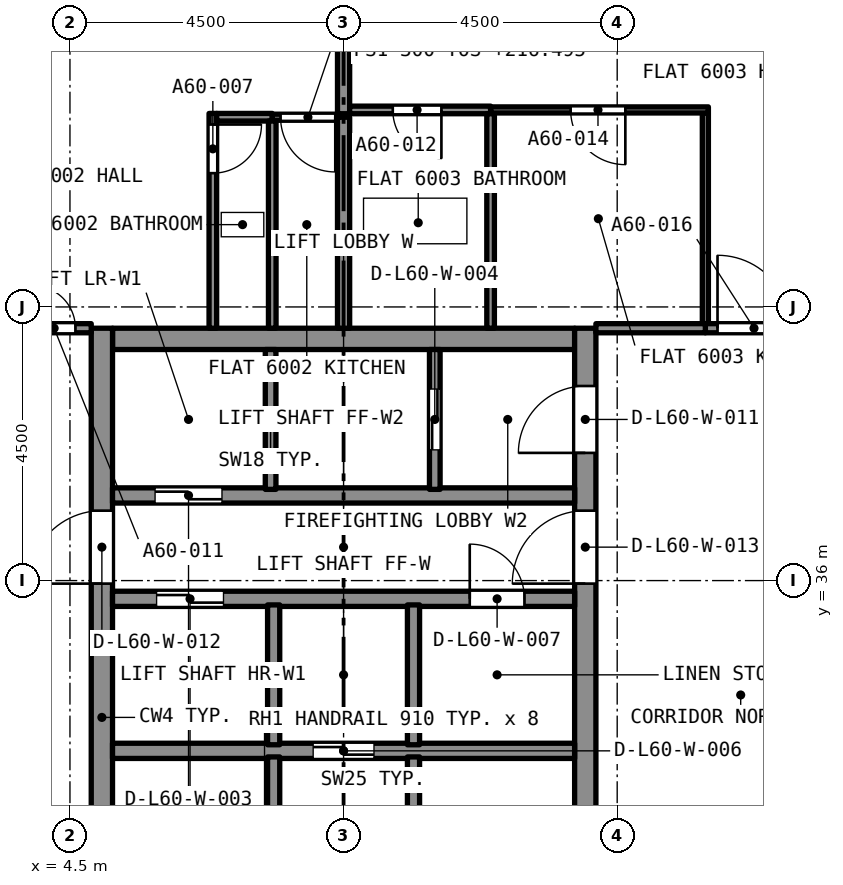
"""IFC4 building model, lengths in metres.
Left out: names, types, materials, properties, quantities, classifications, styles, units other than length and angle.
Written with IfcOpenShell. Run it as: python <this file> out.ifc"""

import sys

from ifc_helpers import new_model, si_unit, direction, frame, frame_2d, origin, place, context, subcontext, project, spatial, rectangle, extrude, element, fill, save


model = new_model("IFC4")
c1 = context("Model", 3, precision=1e-05, world=origin(), true_north=direction((0.0, 1.0)))
c2 = subcontext(c1, "Body", "Model", "MODEL_VIEW")
j1 = project(units=[si_unit("LENGTHUNIT", "METRE"), si_unit("PLANEANGLEUNIT", "RADIAN")], contexts=[c1])
p1 = place(None, origin())
s1 = spatial("IfcSite", under=j1, at=p1, CompositionType="ELEMENT")
p2 = place(p1, origin())
s2 = spatial("IfcBuilding", under=s1, at=p2, CompositionType="ELEMENT")
p3 = place(p2, frame((0.0, 0.0, 216.495)))
s3 = spatial("IfcBuildingStorey", under=s2, at=p3, CompositionType="ELEMENT", Elevation=216.495)
p4 = place(p3, frame((5.2, 39.975, 0.0), z_axis=(0.0, 0.0, 1.0), x_axis=(1.0, 0.0, 0.0)))
e1 = element("IfcWall", 1, at=p4, inside=s3, PredefinedType="SOLIDWALL", context=c2, shape_type="SweptSolid", body=[
    extrude(rectangle(XDim=7.6, YDim=0.35, at=frame_2d((3.8, 0.0))), origin(), (0.0, 0.0, 1.0), 3.2),
])
p5 = place(p3, frame((5.025, 27.35, 0.0), z_axis=(0.0, 0.0, 1.0), x_axis=(0.0, 1.0, 0.0)))
e2 = element("IfcWall", 2, at=p5, inside=s3, PredefinedType="SOLIDWALL", context=c2, shape_type="SweptSolid", body=[
    extrude(rectangle(XDim=12.8, YDim=0.35, at=frame_2d((6.4, 0.0))), origin(), (0.0, 0.0, 1.0), 3.2),
])
p6 = place(p5, frame((8.6, 0.0, 0.0)))
e3 = element("IfcOpeningElement", 3, at=p6, cuts=e2, PredefinedType="OPENING", context=c2, shape_type="SweptSolid", body=[
    extrude(rectangle(XDim=1.2, YDim=2.1, at=frame_2d((0.6, 1.05))), frame((0.0, 0.185, 0.0), z_axis=(0.0, -1.0, 0.0), x_axis=(1.0, 0.0, 0.0)), (0.0, 0.0, 1.0), 0.37),
])
p7 = place(p3, frame((12.975, 27.35, 0.0), z_axis=(0.0, 0.0, 1.0), x_axis=(0.0, 1.0, 0.0)))
e4 = element("IfcWall", 4, at=p7, inside=s3, PredefinedType="SOLIDWALL", context=c2, shape_type="SweptSolid", body=[
    extrude(rectangle(XDim=12.8, YDim=0.35, at=frame_2d((6.4, 0.0))), origin(), (0.0, 0.0, 1.0), 3.2),
])
p8 = place(p7, frame((10.75, 0.0, 0.0)))
e5 = element("IfcOpeningElement", 5, at=p8, cuts=e4, PredefinedType="OPENING", context=c2, shape_type="SweptSolid", body=[
    extrude(rectangle(XDim=1.1, YDim=2.1, at=frame_2d((0.55, 1.05))), frame((0.0, 0.185, 0.0), z_axis=(0.0, -1.0, 0.0), x_axis=(1.0, 0.0, 0.0)), (0.0, 0.0, 1.0), 0.37),
])
p9 = place(p7, frame((8.6, 0.0, 0.0)))
e6 = element("IfcOpeningElement", 6, at=p9, cuts=e4, PredefinedType="OPENING", context=c2, shape_type="SweptSolid", body=[
    extrude(rectangle(XDim=1.2, YDim=2.1, at=frame_2d((0.6, 1.05))), frame((0.0, 0.185, 0.0), z_axis=(0.0, -1.0, 0.0), x_axis=(1.0, 0.0, 0.0)), (0.0, 0.0, 1.0), 0.37),
])
p10 = place(p3, frame((6.85, 43.683, 0.0), z_axis=(0.0, 0.0, 1.0), x_axis=(0.0, -1.0, 0.0)))
e7 = element("IfcWall", 7, at=p10, inside=s3, PredefinedType="PARTITIONING", context=c2, shape_type="SweptSolid", body=[
    extrude(rectangle(XDim=3.533, YDim=0.125, at=frame_2d((1.766, 0.0))), origin(), (0.0, 0.0, 1.0), 2.9),
])
p11 = place(p10, frame((0.183, 0.0, 0.0)))
e8 = element("IfcOpeningElement", 8, at=p11, cuts=e7, PredefinedType="OPENING", context=c2, shape_type="SweptSolid", body=[
    extrude(rectangle(XDim=0.8, YDim=2.1, at=frame_2d((0.4, 1.05))), frame((0.0, 0.073, 0.0), z_axis=(0.0, -1.0, 0.0), x_axis=(1.0, 0.0, 0.0)), (0.0, 0.0, 1.0), 0.145),
])
p12 = place(p3, frame((6.913, 43.62, 0.0), z_axis=(0.0, 0.0, 1.0), x_axis=(1.0, 0.0, 0.0)))
e9 = element("IfcWall", 9, at=p12, inside=s3, PredefinedType="PARTITIONING", context=c2, shape_type="SweptSolid", body=[
    extrude(rectangle(XDim=0.915, YDim=0.125, at=frame_2d((0.458, 0.0))), origin(), (0.0, 0.0, 1.0), 2.9),
])
p13 = place(p3, frame((7.827, 40.15, 0.0), z_axis=(0.0, 0.0, 1.0), x_axis=(0.0, 1.0, 0.0)))
e10 = element("IfcWall", 10, at=p13, inside=s3, PredefinedType="PARTITIONING", context=c2, shape_type="SweptSolid", body=[
    extrude(rectangle(XDim=3.408, YDim=0.125, at=frame_2d((1.704, 0.0))), origin(), (0.0, 0.0, 1.0), 2.9),
])
p14 = place(p3, frame((9.0, 43.62, 0.0), z_axis=(0.0, 0.0, 1.0), x_axis=(-1.0, 0.0, 0.0)))
e11 = element("IfcWall", 11, at=p14, inside=s3, PredefinedType="PARTITIONING", context=c2, shape_type="SweptSolid", body=[
    extrude(rectangle(XDim=1.173, YDim=0.1, at=frame_2d((0.586, 0.0))), origin(), (0.0, 0.0, 1.0), 2.9),
])
p15 = place(p14, frame((0.136, 0.0, 0.0)))
e12 = element("IfcOpeningElement", 12, at=p15, cuts=e11, PredefinedType="OPENING", context=c2, shape_type="SweptSolid", body=[
    extrude(rectangle(XDim=0.9, YDim=2.1, at=frame_2d((0.45, 1.05))), frame((0.0, 0.06, 0.0), z_axis=(0.0, -1.0, 0.0), x_axis=(1.0, 0.0, 0.0)), (0.0, 0.0, 1.0), 0.12),
])
p16 = place(p3, frame((9.0, 43.677, 0.0), z_axis=(0.0, 0.0, 1.0), x_axis=(0.0, 1.0, 0.0)))
e13 = element("IfcWall", 13, at=p16, inside=s3, PredefinedType="PARTITIONING", context=c2, shape_type="SweptSolid", body=[
    extrude(rectangle(XDim=1.373, YDim=0.2, at=frame_2d((0.686, 0.0))), origin(), (0.0, 0.0, 1.0), 2.9),
])
p17 = place(p3, frame((3.65, 40.15, 0.0), z_axis=(0.0, 0.0, 1.0), x_axis=(1.0, 0.0, 0.0)))
e14 = element("IfcWall", 14, at=p17, inside=s3, PredefinedType="PARTITIONING", context=c2, shape_type="SweptSolid", body=[
    extrude(rectangle(XDim=1.2, YDim=0.15, at=frame_2d((0.6, 0.0))), origin(), (0.0, 0.0, 1.0), 2.9),
])
p18 = place(p17, frame((0.24, 0.0, 0.0)))
e15 = element("IfcOpeningElement", 15, at=p18, cuts=e14, PredefinedType="OPENING", context=c2, shape_type="SweptSolid", body=[
    extrude(rectangle(XDim=0.7, YDim=2.1, at=frame_2d((0.35, 1.05))), frame((0.0, 0.085, 0.0), z_axis=(0.0, -1.0, 0.0), x_axis=(1.0, 0.0, 0.0)), (0.0, 0.0, 1.0), 0.17),
])
p19 = place(p3, frame((9.0, 40.15, 0.0), z_axis=(0.0, 0.0, 1.0), x_axis=(0.0, 1.0, 0.0)))
e16 = element("IfcWall", 16, at=p19, inside=s3, PredefinedType="PARTITIONING", context=c2, shape_type="SweptSolid", body=[
    extrude(rectangle(XDim=3.47, YDim=0.2, at=frame_2d((1.735, 0.0))), origin(), (0.0, 0.0, 1.0), 2.9),
])
p20 = place(p3, frame((11.418, 43.74, 0.0), z_axis=(0.0, 0.0, 1.0), x_axis=(-1.0, 0.0, 0.0)))
e17 = element("IfcWall", 17, at=p20, inside=s3, PredefinedType="PARTITIONING", context=c2, shape_type="SweptSolid", body=[
    extrude(rectangle(XDim=2.318, YDim=0.125, at=frame_2d((1.159, 0.0))), origin(), (0.0, 0.0, 1.0), 2.9),
])
p21 = place(p20, frame((0.809, 0.0, 0.0)))
e18 = element("IfcOpeningElement", 18, at=p21, cuts=e17, PredefinedType="OPENING", context=c2, shape_type="SweptSolid", body=[
    extrude(rectangle(XDim=0.8, YDim=2.1, at=frame_2d((0.4, 1.05))), frame((0.0, 0.073, 0.0), z_axis=(0.0, -1.0, 0.0), x_axis=(1.0, 0.0, 0.0)), (0.0, 0.0, 1.0), 0.145),
])
p22 = place(p3, frame((11.418, 40.15, 0.0), z_axis=(0.0, 0.0, 1.0), x_axis=(0.0, 1.0, 0.0)))
e19 = element("IfcWall", 19, at=p22, inside=s3, PredefinedType="PARTITIONING", context=c2, shape_type="SweptSolid", body=[
    extrude(rectangle(XDim=3.528, YDim=0.125, at=frame_2d((1.764, 0.0))), origin(), (0.0, 0.0, 1.0), 2.9),
])
p23 = place(p3, frame((14.95, 40.225, 0.0), z_axis=(0.0, 0.0, 1.0), x_axis=(0.0, 1.0, 0.0)))
e20 = element("IfcWall", 20, at=p23, inside=s3, PredefinedType="PARTITIONING", context=c2, shape_type="SweptSolid", body=[
    extrude(rectangle(XDim=3.465, YDim=0.1, at=frame_2d((1.732, 0.0))), origin(), (0.0, 0.0, 1.0), 2.9),
])
p24 = place(p3, frame((15.0, 43.74, 0.0), z_axis=(0.0, 0.0, 1.0), x_axis=(-1.0, 0.0, 0.0)))
e21 = element("IfcWall", 21, at=p24, inside=s3, PredefinedType="PARTITIONING", context=c2, shape_type="SweptSolid", body=[
    extrude(rectangle(XDim=3.582, YDim=0.1, at=frame_2d((1.791, 0.0))), origin(), (0.0, 0.0, 1.0), 2.9),
])
p25 = place(p24, frame((1.366, 0.0, 0.0)))
e22 = element("IfcOpeningElement", 22, at=p25, cuts=e21, PredefinedType="OPENING", context=c2, shape_type="SweptSolid", body=[
    extrude(rectangle(XDim=0.9, YDim=2.1, at=frame_2d((0.45, 1.05))), frame((0.0, 0.06, 0.0), z_axis=(0.0, -1.0, 0.0), x_axis=(1.0, 0.0, 0.0)), (0.0, 0.0, 1.0), 0.12),
])
p26 = place(p3, frame((14.95, 40.15, 0.0), z_axis=(0.0, 0.0, 1.0), x_axis=(1.0, 0.0, 0.0)))
e23 = element("IfcWall", 23, at=p26, inside=s3, PredefinedType="PARTITIONING", context=c2, shape_type="SweptSolid", body=[
    extrude(rectangle(XDim=2.65, YDim=0.15, at=frame_2d((1.325, 0.0))), origin(), (0.0, 0.0, 1.0), 2.9),
])
p27 = place(p26, frame((0.2, 0.0, 0.0)))
e24 = element("IfcOpeningElement", 24, at=p27, cuts=e23, PredefinedType="OPENING", context=c2, shape_type="SweptSolid", body=[
    extrude(rectangle(XDim=1.2, YDim=2.4, at=frame_2d((0.6, 1.2))), frame((0.0, 0.085, 0.0), z_axis=(0.0, -1.0, 0.0), x_axis=(1.0, 0.0, 0.0)), (0.0, 0.0, 1.0), 0.17),
])
p28 = place(p3, frame((13.15, 40.15, 0.0), z_axis=(0.0, 0.0, 1.0), x_axis=(1.0, 0.0, 0.0)))
e25 = element("IfcWall", 25, at=p28, inside=s3, PredefinedType="PARTITIONING", context=c2, shape_type="SweptSolid", body=[
    extrude(rectangle(XDim=1.8, YDim=0.15, at=frame_2d((0.9, 0.0))), origin(), (0.0, 0.0, 1.0), 2.9),
])
p29 = place(p3, frame((5.2, 33.2, 0.0), z_axis=(0.0, 0.0, 1.0), x_axis=(1.0, 0.0, 0.0)))
e26 = element("IfcWall", 26, at=p29, inside=s3, PredefinedType="SOLIDWALL", context=c2, shape_type="SweptSolid", body=[
    extrude(rectangle(XDim=7.6, YDim=0.25, at=frame_2d((3.8, 0.0))), origin(), (0.0, 0.0, 1.0), 2.9),
])
p30 = place(p29, frame((3.3, 0.0, 0.0)))
e27 = element("IfcOpeningElement", 27, at=p30, cuts=e26, PredefinedType="OPENING", context=c2, shape_type="SweptSolid", body=[
    extrude(rectangle(XDim=1.0, YDim=2.1, at=frame_2d((0.5, 1.05))), frame((0.0, 0.135, 0.0), z_axis=(0.0, -1.0, 0.0), x_axis=(1.0, 0.0, 0.0)), (0.0, 0.0, 1.0), 0.27),
])
p31 = place(p3, frame((5.2, 35.7, 0.0), z_axis=(0.0, 0.0, 1.0), x_axis=(1.0, 0.0, 0.0)))
e28 = element("IfcWall", 28, at=p31, inside=s3, PredefinedType="SOLIDWALL", context=c2, shape_type="SweptSolid", body=[
    extrude(rectangle(XDim=7.6, YDim=0.25, at=frame_2d((3.8, 0.0))), origin(), (0.0, 0.0, 1.0), 2.9),
])
p32 = place(p31, frame((0.725, 0.0, 0.0)))
e29 = element("IfcOpeningElement", 29, at=p32, cuts=e28, PredefinedType="OPENING", context=c2, shape_type="SweptSolid", body=[
    extrude(rectangle(XDim=1.1, YDim=2.4, at=frame_2d((0.55, 1.2))), frame((0.0, 0.135, 0.0), z_axis=(0.0, -1.0, 0.0), x_axis=(1.0, 0.0, 0.0)), (0.0, 0.0, 1.0), 0.27),
])
p33 = place(p31, frame((5.875, 0.0, 0.0)))
e30 = element("IfcOpeningElement", 30, at=p33, cuts=e28, PredefinedType="OPENING", context=c2, shape_type="SweptSolid", body=[
    extrude(rectangle(XDim=0.9, YDim=2.1, at=frame_2d((0.45, 1.05))), frame((0.0, 0.135, 0.0), z_axis=(0.0, -1.0, 0.0), x_axis=(1.0, 0.0, 0.0)), (0.0, 0.0, 1.0), 0.27),
])
p34 = place(p3, frame((5.2, 37.4, 0.0), z_axis=(0.0, 0.0, 1.0), x_axis=(1.0, 0.0, 0.0)))
e31 = element("IfcWall", 31, at=p34, inside=s3, PredefinedType="SOLIDWALL", context=c2, shape_type="SweptSolid", body=[
    extrude(rectangle(XDim=7.6, YDim=0.25, at=frame_2d((3.8, 0.0))), origin(), (0.0, 0.0, 1.0), 2.9),
])
p35 = place(p34, frame((0.7, 0.0, 0.0)))
e32 = element("IfcOpeningElement", 32, at=p35, cuts=e31, PredefinedType="OPENING", context=c2, shape_type="SweptSolid", body=[
    extrude(rectangle(XDim=1.1, YDim=2.4, at=frame_2d((0.55, 1.2))), frame((0.0, 0.135, 0.0), z_axis=(0.0, -1.0, 0.0), x_axis=(1.0, 0.0, 0.0)), (0.0, 0.0, 1.0), 0.27),
])
p36 = place(p3, frame((7.85, 27.7, 0.0), z_axis=(0.0, 0.0, 1.0), x_axis=(0.0, 1.0, 0.0)))
e33 = element("IfcWall", 33, at=p36, inside=s3, PredefinedType="SOLIDWALL", context=c2, shape_type="SweptSolid", body=[
    extrude(rectangle(XDim=5.4, YDim=0.2, at=frame_2d((2.7, 0.0))), origin(), (0.0, 0.0, 1.0), 2.9),
])
p37 = place(p36, frame((0.2, 0.0, 0.0)))
e34 = element("IfcOpeningElement", 34, at=p37, cuts=e33, PredefinedType="OPENING", context=c2, shape_type="SweptSolid", body=[
    extrude(rectangle(XDim=0.9, YDim=2.1, at=frame_2d((0.45, 1.05))), frame((0.0, 0.11, 0.0), z_axis=(0.0, -1.0, 0.0), x_axis=(1.0, 0.0, 0.0)), (0.0, 0.0, 1.0), 0.22),
])
p38 = place(p3, frame((10.15, 27.7, 0.0), z_axis=(0.0, 0.0, 1.0), x_axis=(0.0, 1.0, 0.0)))
e35 = element("IfcWall", 35, at=p38, inside=s3, PredefinedType="SOLIDWALL", context=c2, shape_type="SweptSolid", body=[
    extrude(rectangle(XDim=5.4, YDim=0.2, at=frame_2d((2.7, 0.0))), origin(), (0.0, 0.0, 1.0), 2.9),
])
p39 = place(p38, frame((0.2, 0.0, 0.0)))
e36 = element("IfcOpeningElement", 36, at=p39, cuts=e35, PredefinedType="OPENING", context=c2, shape_type="SweptSolid", body=[
    extrude(rectangle(XDim=0.9, YDim=2.1, at=frame_2d((0.45, 1.05))), frame((0.0, 0.11, 0.0), z_axis=(0.0, -1.0, 0.0), x_axis=(1.0, 0.0, 0.0)), (0.0, 0.0, 1.0), 0.22),
])
for number, where, z_axis, x_axis in (
    (37, (7.85, 33.3, 0.0), (0.0, 0.0, 1.0), (0.0, 1.0, 0.0)),
    (38, (10.15, 33.3, 0.0), (0.0, 0.0, 1.0), (0.0, 1.0, 0.0)),
):
    element("IfcWall", number, at=place(p3, frame(where, z_axis=z_axis, x_axis=x_axis)), inside=s3, PredefinedType="SOLIDWALL", context=c2, shape_type="SweptSolid", body=[
        extrude(rectangle(XDim=2.3, YDim=0.2, at=frame_2d((1.15, 0.0))), origin(), (0.0, 0.0, 1.0), 2.9),
    ])
p40 = place(p3, frame((7.8, 37.5, 0.0), z_axis=(0.0, 0.0, 1.0), x_axis=(0.0, 1.0, 0.0)))
e39 = element("IfcWall", 39, at=p40, inside=s3, PredefinedType="SOLIDWALL", context=c2, shape_type="SweptSolid", body=[
    extrude(rectangle(XDim=2.3, YDim=0.175, at=frame_2d((1.15, 0.0))), origin(), (0.0, 0.0, 1.0), 2.9),
])
p41 = place(p3, frame((10.5, 37.5, 0.0), z_axis=(0.0, 0.0, 1.0), x_axis=(0.0, 1.0, 0.0)))
e40 = element("IfcWall", 40, at=p41, inside=s3, PredefinedType="SOLIDWALL", context=c2, shape_type="SweptSolid", body=[
    extrude(rectangle(XDim=2.3, YDim=0.175, at=frame_2d((1.15, 0.0))), origin(), (0.0, 0.0, 1.0), 2.9),
])
p42 = place(p41, frame((0.65, 0.0, 0.0)))
e41 = element("IfcOpeningElement", 41, at=p42, cuts=e40, PredefinedType="OPENING", context=c2, shape_type="SweptSolid", body=[
    extrude(rectangle(XDim=1.0, YDim=2.1, at=frame_2d((0.5, 1.05))), frame((0.0, 0.097, 0.0), z_axis=(0.0, -1.0, 0.0), x_axis=(1.0, 0.0, 0.0)), (0.0, 0.0, 1.0), 0.195),
])
p43 = place(p11, origin())
e42 = element("IfcDoor", 42, at=p43, inside=s3, OperationType="SINGLE_SWING_LEFT", PredefinedType="DOOR", context=c2, shape_type="SweptSolid", body=[
    extrude(rectangle(XDim=0.8, YDim=2.1, at=frame_2d((0.4, 1.05))), frame((0.0, 0.025, 0.0), z_axis=(0.0, -1.0, 0.0), x_axis=(1.0, 0.0, 0.0)), (0.0, 0.0, 1.0), 0.05),
])
fill(e8, e42)
p44 = place(p15, origin())
e43 = element("IfcDoor", 43, at=p44, inside=s3, OperationType="SINGLE_SWING_RIGHT", PredefinedType="DOOR", context=c2, shape_type="SweptSolid", body=[
    extrude(rectangle(XDim=0.9, YDim=2.1, at=frame_2d((0.45, 1.05))), frame((0.0, 0.025, 0.0), z_axis=(0.0, -1.0, 0.0), x_axis=(1.0, 0.0, 0.0)), (0.0, 0.0, 1.0), 0.05),
])
fill(e12, e43)
p45 = place(p18, origin())
e44 = element("IfcDoor", 44, at=p45, inside=s3, OperationType="SINGLE_SWING_LEFT", PredefinedType="DOOR", context=c2, shape_type="SweptSolid", body=[
    extrude(rectangle(XDim=0.7, YDim=2.1, at=frame_2d((0.35, 1.05))), frame((0.0, 0.025, 0.0), z_axis=(0.0, -1.0, 0.0), x_axis=(1.0, 0.0, 0.0)), (0.0, 0.0, 1.0), 0.05),
])
fill(e15, e44)
p46 = place(p21, origin())
e45 = element("IfcDoor", 45, at=p46, inside=s3, OperationType="SINGLE_SWING_RIGHT", PredefinedType="DOOR", context=c2, shape_type="SweptSolid", body=[
    extrude(rectangle(XDim=0.8, YDim=2.1, at=frame_2d((0.4, 1.05))), frame((0.0, 0.025, 0.0), z_axis=(0.0, -1.0, 0.0), x_axis=(1.0, 0.0, 0.0)), (0.0, 0.0, 1.0), 0.05),
])
fill(e18, e45)
p47 = place(p25, origin())
e46 = element("IfcDoor", 46, at=p47, inside=s3, OperationType="SINGLE_SWING_RIGHT", PredefinedType="DOOR", context=c2, shape_type="SweptSolid", body=[
    extrude(rectangle(XDim=0.9, YDim=2.1, at=frame_2d((0.45, 1.05))), frame((0.0, 0.025, 0.0), z_axis=(0.0, -1.0, 0.0), x_axis=(1.0, 0.0, 0.0)), (0.0, 0.0, 1.0), 0.05),
])
fill(e22, e46)
p48 = place(p27, origin())
e47 = element("IfcDoor", 47, at=p48, inside=s3, OperationType="SINGLE_SWING_LEFT", PredefinedType="DOOR", context=c2, shape_type="SweptSolid", body=[
    extrude(rectangle(XDim=1.2, YDim=2.4, at=frame_2d((0.6, 1.2))), frame((0.0, 0.025, 0.0), z_axis=(0.0, -1.0, 0.0), x_axis=(1.0, 0.0, 0.0)), (0.0, 0.0, 1.0), 0.05),
])
fill(e24, e47)
p49 = place(p35, origin())
e48 = element("IfcDoor", 48, at=p49, inside=s3, OperationType="SLIDING_TO_LEFT", PredefinedType="DOOR", context=c2, shape_type="SweptSolid", body=[
    extrude(rectangle(XDim=1.1, YDim=2.4, at=frame_2d((0.55, 1.2))), frame((0.0, 0.025, 0.0), z_axis=(0.0, -1.0, 0.0), x_axis=(1.0, 0.0, 0.0)), (0.0, 0.0, 1.0), 0.05),
])
fill(e32, e48)
p50 = place(p42, origin())
e49 = element("IfcDoor", 49, at=p50, inside=s3, OperationType="SLIDING_TO_LEFT", PredefinedType="DOOR", context=c2, shape_type="SweptSolid", body=[
    extrude(rectangle(XDim=1.0, YDim=2.1, at=frame_2d((0.5, 1.05))), frame((0.0, 0.025, 0.0), z_axis=(0.0, -1.0, 0.0), x_axis=(1.0, 0.0, 0.0)), (0.0, 0.0, 1.0), 0.05),
])
fill(e41, e49)
p51 = place(p32, origin())
e50 = element("IfcDoor", 50, at=p51, inside=s3, OperationType="SLIDING_TO_LEFT", PredefinedType="DOOR", context=c2, shape_type="SweptSolid", body=[
    extrude(rectangle(XDim=1.1, YDim=2.4, at=frame_2d((0.55, 1.2))), frame((0.0, 0.025, 0.0), z_axis=(0.0, -1.0, 0.0), x_axis=(1.0, 0.0, 0.0)), (0.0, 0.0, 1.0), 0.05),
])
fill(e29, e50)
p52 = place(p30, origin())
e51 = element("IfcDoor", 51, at=p52, inside=s3, OperationType="SLIDING_TO_LEFT", PredefinedType="DOOR", context=c2, shape_type="SweptSolid", body=[
    extrude(rectangle(XDim=1.0, YDim=2.1, at=frame_2d((0.5, 1.05))), frame((0.0, 0.025, 0.0), z_axis=(0.0, -1.0, 0.0), x_axis=(1.0, 0.0, 0.0)), (0.0, 0.0, 1.0), 0.05),
])
fill(e27, e51)
p53 = place(p33, origin())
e52 = element("IfcDoor", 52, at=p53, inside=s3, OperationType="SINGLE_SWING_LEFT", PredefinedType="DOOR", context=c2, shape_type="SweptSolid", body=[
    extrude(rectangle(XDim=0.9, YDim=2.1, at=frame_2d((0.45, 1.05))), frame((0.0, 0.025, 0.0), z_axis=(0.0, -1.0, 0.0), x_axis=(1.0, 0.0, 0.0)), (0.0, 0.0, 1.0), 0.05),
])
fill(e30, e52)
p54 = place(p8, origin())
e53 = element("IfcDoor", 53, at=p54, inside=s3, OperationType="SINGLE_SWING_LEFT", PredefinedType="DOOR", context=c2, shape_type="SweptSolid", body=[
    extrude(rectangle(XDim=1.1, YDim=2.1, at=frame_2d((0.55, 1.05))), frame((0.0, 0.025, 0.0), z_axis=(0.0, -1.0, 0.0), x_axis=(1.0, 0.0, 0.0)), (0.0, 0.0, 1.0), 0.05),
])
fill(e5, e53)
p55 = place(p6, origin())
e54 = element("IfcDoor", 54, at=p55, inside=s3, OperationType="SINGLE_SWING_LEFT", PredefinedType="DOOR", context=c2, shape_type="SweptSolid", body=[
    extrude(rectangle(XDim=1.2, YDim=2.1, at=frame_2d((0.6, 1.05))), frame((0.0, 0.025, 0.0), z_axis=(0.0, -1.0, 0.0), x_axis=(1.0, 0.0, 0.0)), (0.0, 0.0, 1.0), 0.05),
])
fill(e3, e54)
p56 = place(p9, origin())
e55 = element("IfcDoor", 55, at=p56, inside=s3, OperationType="SINGLE_SWING_LEFT", PredefinedType="DOOR", context=c2, shape_type="SweptSolid", body=[
    extrude(rectangle(XDim=1.2, YDim=2.1, at=frame_2d((0.6, 1.05))), frame((0.0, 0.025, 0.0), z_axis=(0.0, -1.0, 0.0), x_axis=(1.0, 0.0, 0.0)), (0.0, 0.0, 1.0), 0.05),
])
fill(e6, e55)
save(model, sys.argv[1])
